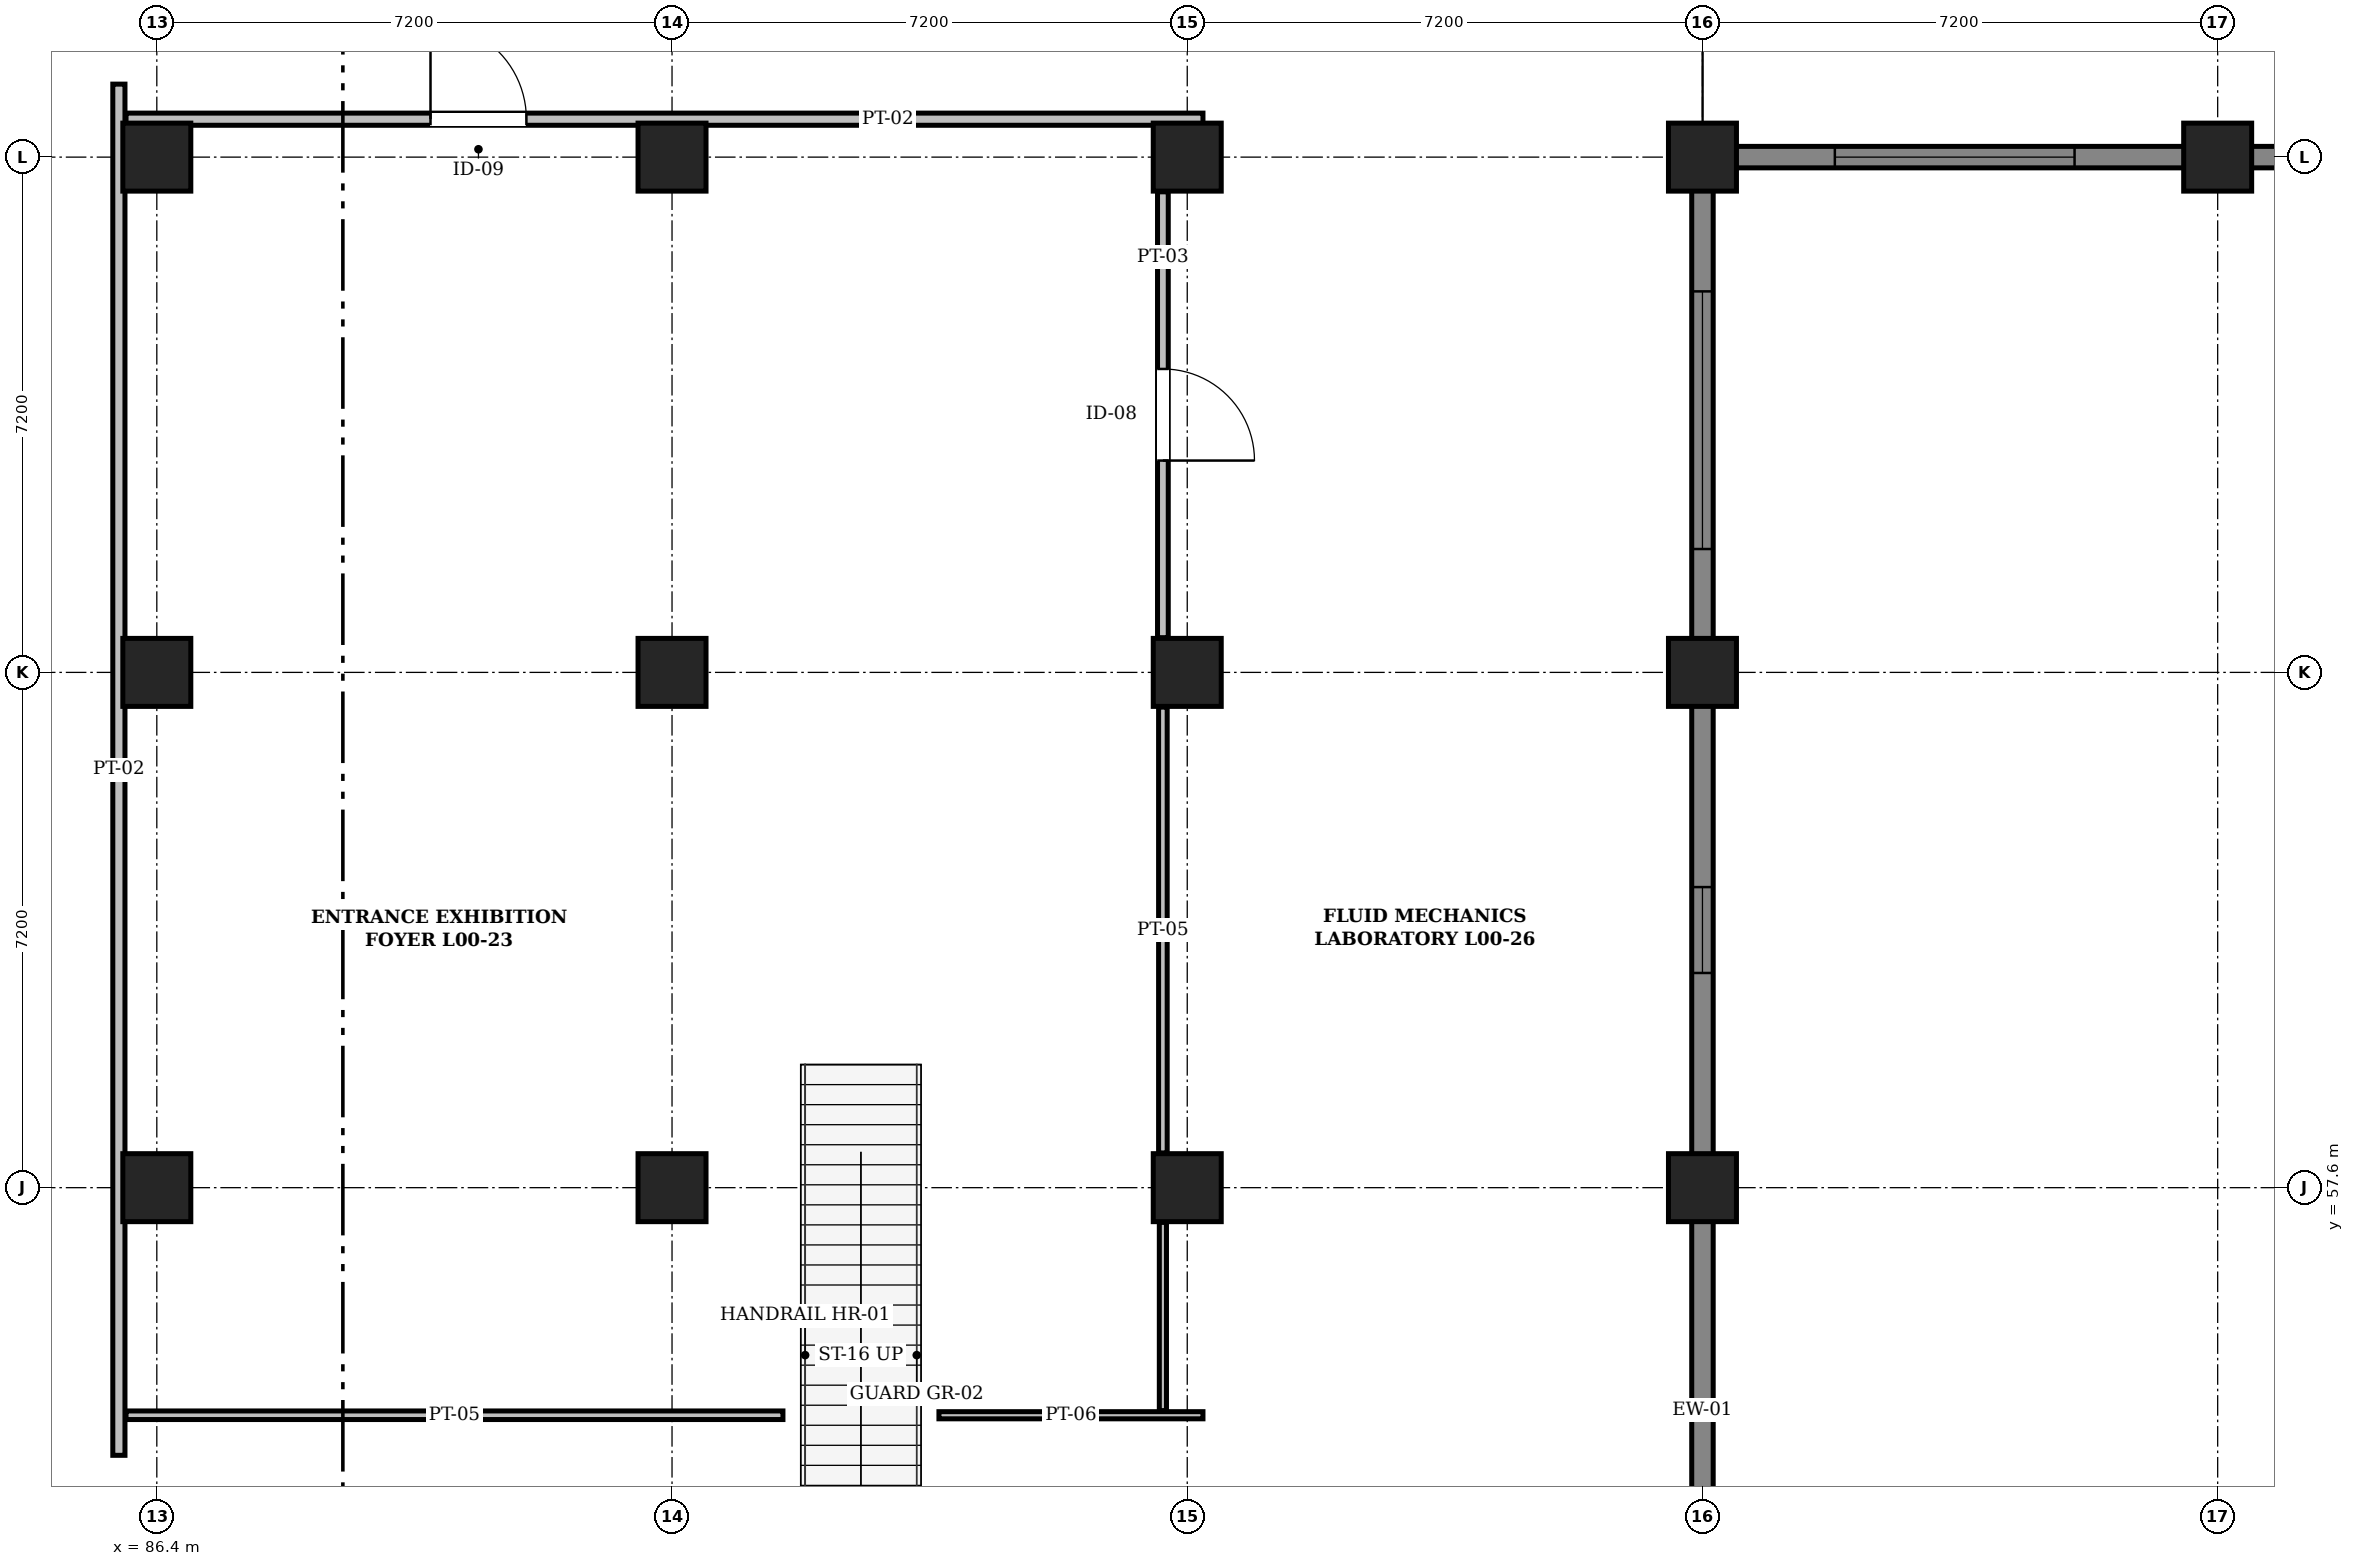
"""IFC4 building model, lengths in metres.
Left out: names, types, materials, properties, quantities, classifications, styles, units other than length and angle.
Written with IfcOpenShell. Run it as: python <this file> out.ifc"""

import sys

from ifc_helpers import new_model, si_unit, direction, frame, frame_2d, origin, origin_2d, place, context, subcontext, project, spatial, rectangle, extrude, element, fill, save


model = new_model("IFC4")
c1 = context("Model", 3, precision=1e-05, world=origin(), true_north=direction((0.0, 1.0)))
c2 = subcontext(c1, "Body", "Model", "MODEL_VIEW")
j1 = project(units=[si_unit("LENGTHUNIT", "METRE"), si_unit("PLANEANGLEUNIT", "RADIAN")], contexts=[c1])
p1 = place(None, origin())
s1 = spatial("IfcSite", under=j1, at=p1, CompositionType="ELEMENT")
p2 = place(p1, origin())
s2 = spatial("IfcBuilding", under=s1, at=p2, CompositionType="ELEMENT")
p3 = place(p2, origin())
s3 = spatial("IfcBuildingStorey", under=s2, at=p3, CompositionType="ELEMENT", Elevation=0.0)
for number, where, z_axis, x_axis in (
    (1, (86.4, 57.6, 0.0), (0.0, 0.0, 1.0), (1.0, 0.0, 0.0)),
    (2, (86.4, 64.8, 0.0), (0.0, 0.0, 1.0), (1.0, 0.0, 0.0)),
    (3, (86.4, 72.0, 0.0), (0.0, 0.0, 1.0), (1.0, 0.0, 0.0)),
    (4, (93.6, 57.6, 0.0), (0.0, 0.0, 1.0), (1.0, 0.0, 0.0)),
    (5, (93.6, 64.8, 0.0), (0.0, 0.0, 1.0), (1.0, 0.0, 0.0)),
    (6, (93.6, 72.0, 0.0), (0.0, 0.0, 1.0), (1.0, 0.0, 0.0)),
    (7, (100.8, 57.6, 0.0), (0.0, 0.0, 1.0), (1.0, 0.0, 0.0)),
    (8, (100.8, 64.8, 0.0), (0.0, 0.0, 1.0), (1.0, 0.0, 0.0)),
    (9, (100.8, 72.0, 0.0), (0.0, 0.0, 1.0), (1.0, 0.0, 0.0)),
    (10, (108.0, 57.6, 0.0), (0.0, 0.0, 1.0), (1.0, 0.0, 0.0)),
    (11, (108.0, 64.8, 0.0), (0.0, 0.0, 1.0), (1.0, 0.0, 0.0)),
    (12, (108.0, 72.0, 0.0), (0.0, 0.0, 1.0), (1.0, 0.0, 0.0)),
    (13, (115.2, 72.0, 0.0), (0.0, 0.0, 1.0), (1.0, 0.0, 0.0)),
):
    element("IfcColumn", number, at=place(p3, frame(where, z_axis=z_axis, x_axis=x_axis)), inside=s3, PredefinedType="COLUMN", context=c2, shape_type="SweptSolid", body=[
        extrude(rectangle(XDim=0.95, YDim=0.95, at=origin_2d()), origin(), (0.0, 0.0, 1.0), 4.8),
    ])
p4 = place(p3, frame((122.4, 72.0, 0.0), z_axis=(0.0, 0.0, 1.0), x_axis=(-1.0, 0.0, 0.0)))
e14 = element("IfcWall", 14, at=p4, inside=s3, PredefinedType="SOLIDWALL", context=c2, shape_type="SweptSolid", body=[
    extrude(rectangle(XDim=7.2, YDim=0.3, at=frame_2d((3.6, 0.0))), origin(), (0.0, 0.0, 1.0), 4.52),
])
p5 = place(p4, frame((2.05, 0.0, 0.95)))
e15 = element("IfcOpeningElement", 15, at=p5, cuts=e14, PredefinedType="OPENING", context=c2, shape_type="SweptSolid", body=[
    extrude(rectangle(XDim=3.1, YDim=1.55, at=frame_2d((1.55, 0.775))), frame((0.0, 0.162, 0.0), z_axis=(0.0, -1.0, 0.0), x_axis=(1.0, 0.0, 0.0)), (0.0, 0.0, 1.0), 0.324),
])
p6 = place(p3, frame((115.2, 72.0, 0.0), z_axis=(0.0, 0.0, 1.0), x_axis=(-1.0, 0.0, 0.0)))
e16 = element("IfcWall", 16, at=p6, inside=s3, PredefinedType="SOLIDWALL", context=c2, shape_type="SweptSolid", body=[
    extrude(rectangle(XDim=7.35, YDim=0.3, at=frame_2d((3.675, 0.0))), origin(), (0.0, 0.0, 1.0), 4.52),
])
p7 = place(p6, frame((2.0, 0.0, 0.95)))
e17 = element("IfcOpeningElement", 17, at=p7, cuts=e16, PredefinedType="OPENING", context=c2, shape_type="SweptSolid", body=[
    extrude(rectangle(XDim=3.35, YDim=1.55, at=frame_2d((1.675, 0.775))), frame((0.0, 0.162, 0.0), z_axis=(0.0, -1.0, 0.0), x_axis=(1.0, 0.0, 0.0)), (0.0, 0.0, 1.0), 0.324),
])
p8 = place(p3, frame((108.0, 71.848, 0.0), z_axis=(0.0, 0.0, 1.0), x_axis=(0.0, -1.0, 0.0)))
e18 = element("IfcWall", 18, at=p8, inside=s3, PredefinedType="SOLIDWALL", context=c2, shape_type="SweptSolid", body=[
    extrude(rectangle(XDim=7.048, YDim=0.3, at=frame_2d((3.524, 0.0))), origin(), (0.0, 0.0, 1.0), 4.52),
])
p9 = place(p8, frame((1.724, 0.0, 0.95)))
e19 = element("IfcOpeningElement", 19, at=p9, cuts=e18, PredefinedType="OPENING", context=c2, shape_type="SweptSolid", body=[
    extrude(rectangle(XDim=3.6, YDim=1.55, at=frame_2d((1.8, 0.775))), frame((0.0, 0.162, 0.0), z_axis=(0.0, -1.0, 0.0), x_axis=(1.0, 0.0, 0.0)), (0.0, 0.0, 1.0), 0.324),
])
p10 = place(p3, frame((108.0, 64.8, 0.0), z_axis=(0.0, 0.0, 1.0), x_axis=(0.0, -1.0, 0.0)))
e20 = element("IfcWall", 20, at=p10, inside=s3, PredefinedType="SOLIDWALL", context=c2, shape_type="SweptSolid", body=[
    extrude(rectangle(XDim=7.2, YDim=0.3, at=frame_2d((3.6, 0.0))), origin(), (0.0, 0.0, 1.0), 4.52),
])
p11 = place(p10, frame((3.0, 0.0, 0.95)))
e21 = element("IfcOpeningElement", 21, at=p11, cuts=e20, PredefinedType="OPENING", context=c2, shape_type="SweptSolid", body=[
    extrude(rectangle(XDim=1.2, YDim=1.8, at=frame_2d((0.6, 0.9))), frame((0.0, 0.162, 0.0), z_axis=(0.0, -1.0, 0.0), x_axis=(1.0, 0.0, 0.0)), (0.0, 0.0, 1.0), 0.324),
])
p12 = place(p3, frame((108.0, 57.6, 0.0), z_axis=(0.0, 0.0, 1.0), x_axis=(0.0, -1.0, 0.0)))
e22 = element("IfcWall", 22, at=p12, inside=s3, PredefinedType="SOLIDWALL", context=c2, shape_type="SweptSolid", body=[
    extrude(rectangle(XDim=7.2, YDim=0.3, at=frame_2d((3.6, 0.0))), origin(), (0.0, 0.0, 1.0), 4.52),
])
p13 = place(p12, frame((4.455, 0.0, 0.95)))
e23 = element("IfcOpeningElement", 23, at=p13, cuts=e22, PredefinedType="OPENING", context=c2, shape_type="SweptSolid", body=[
    extrude(rectangle(XDim=1.45, YDim=1.8, at=frame_2d((0.725, 0.9))), frame((0.0, 0.162, 0.0), z_axis=(0.0, -1.0, 0.0), x_axis=(1.0, 0.0, 0.0)), (0.0, 0.0, 1.0), 0.324),
])
p14 = place(p3, frame((85.87, 53.86, 0.0), z_axis=(0.0, 0.0, 1.0), x_axis=(0.0, 1.0, 0.0)))
e24 = element("IfcWall", 24, at=p14, inside=s3, PredefinedType="PARTITIONING", context=c2, shape_type="SweptSolid", body=[
    extrude(rectangle(XDim=19.16, YDim=0.17, at=frame_2d((9.58, 0.0))), origin(), (0.0, 0.0, 1.0), 4.46),
])
p15 = place(p3, frame((85.97, 72.53, 0.0), z_axis=(0.0, 0.0, 1.0), x_axis=(1.0, 0.0, 0.0)))
e25 = element("IfcWall", 25, at=p15, inside=s3, PredefinedType="PARTITIONING", context=c2, shape_type="SweptSolid", body=[
    extrude(rectangle(XDim=15.05, YDim=0.17, at=frame_2d((7.525, 0.0))), origin(), (0.0, 0.0, 1.0), 4.46),
])
p16 = place(p15, frame((4.255, 0.0, 0.0)))
e26 = element("IfcOpeningElement", 26, at=p16, cuts=e25, PredefinedType="OPENING", context=c2, shape_type="SweptSolid", body=[
    extrude(rectangle(XDim=1.34, YDim=2.24, at=frame_2d((0.67, 1.12))), frame((0.0, 0.097, 0.0), z_axis=(0.0, -1.0, 0.0), x_axis=(1.0, 0.0, 0.0)), (0.0, 0.0, 1.0), 0.194),
])
p17 = place(p3, frame((85.97, 54.42, 0.0), z_axis=(0.0, 0.0, 1.0), x_axis=(1.0, 0.0, 0.0)))
e27 = element("IfcWall", 27, at=p17, inside=s3, PredefinedType="PARTITIONING", context=c2, shape_type="SweptSolid", body=[
    extrude(rectangle(XDim=9.18, YDim=0.12, at=frame_2d((4.59, 0.0))), origin(), (0.0, 0.0, 1.0), 4.46),
])
p18 = place(p3, frame((97.33, 54.42, 0.0), z_axis=(0.0, 0.0, 1.0), x_axis=(1.0, 0.0, 0.0)))
e28 = element("IfcWall", 28, at=p18, inside=s3, PredefinedType="PARTITIONING", context=c2, shape_type="SweptSolid", body=[
    extrude(rectangle(XDim=3.69, YDim=0.1, at=frame_2d((1.845, 0.0))), origin(), (0.0, 0.0, 1.0), 4.46),
])
p19 = place(p3, frame((100.46, 65.285, 0.0), z_axis=(0.0, 0.0, 1.0), x_axis=(0.0, 1.0, 0.0)))
e29 = element("IfcWall", 29, at=p19, inside=s3, PredefinedType="PARTITIONING", context=c2, shape_type="SweptSolid", body=[
    extrude(rectangle(XDim=6.23, YDim=0.15, at=frame_2d((3.115, 0.0))), origin(), (0.0, 0.0, 1.0), 4.08),
])
p20 = place(p19, frame((2.475, 0.0, 0.0)))
e30 = element("IfcOpeningElement", 30, at=p20, cuts=e29, PredefinedType="OPENING", context=c2, shape_type="SweptSolid", body=[
    extrude(rectangle(XDim=1.28, YDim=2.22, at=frame_2d((0.64, 1.11))), frame((0.0, 0.087, 0.0), z_axis=(0.0, -1.0, 0.0), x_axis=(1.0, 0.0, 0.0)), (0.0, 0.0, 1.0), 0.174),
])
p21 = place(p3, frame((100.46, 58.085, 0.0), z_axis=(0.0, 0.0, 1.0), x_axis=(0.0, 1.0, 0.0)))
e31 = element("IfcWall", 31, at=p21, inside=s3, PredefinedType="PARTITIONING", context=c2, shape_type="SweptSolid", body=[
    extrude(rectangle(XDim=6.23, YDim=0.12, at=frame_2d((3.115, 0.0))), origin(), (0.0, 0.0, 1.0), 4.08),
])
p22 = place(p3, frame((100.46, 54.485, 0.0), z_axis=(0.0, 0.0, 1.0), x_axis=(0.0, 1.0, 0.0)))
e32 = element("IfcWall", 32, at=p22, inside=s3, PredefinedType="PARTITIONING", context=c2, shape_type="SweptSolid", body=[
    extrude(rectangle(XDim=2.63, YDim=0.1, at=frame_2d((1.315, 0.0))), origin(), (0.0, 0.0, 1.0), 4.46),
])
p23 = place(p7, origin())
e33 = element("IfcWindow", 33, at=p23, inside=s3, PartitioningType="SINGLE_PANEL", PredefinedType="WINDOW", context=c2, shape_type="SweptSolid", body=[
    extrude(rectangle(XDim=3.35, YDim=1.55, at=frame_2d((1.675, 0.775))), frame((0.0, 0.03, 0.0), z_axis=(0.0, -1.0, 0.0), x_axis=(1.0, 0.0, 0.0)), (0.0, 0.0, 1.0), 0.06),
])
fill(e17, e33)
p24 = place(p9, origin())
e34 = element("IfcWindow", 34, at=p24, inside=s3, PartitioningType="SINGLE_PANEL", PredefinedType="WINDOW", context=c2, shape_type="SweptSolid", body=[
    extrude(rectangle(XDim=3.6, YDim=1.55, at=frame_2d((1.8, 0.775))), frame((0.0, 0.03, 0.0), z_axis=(0.0, -1.0, 0.0), x_axis=(1.0, 0.0, 0.0)), (0.0, 0.0, 1.0), 0.06),
])
fill(e19, e34)
p25 = place(p11, origin())
e35 = element("IfcWindow", 35, at=p25, inside=s3, PartitioningType="SINGLE_PANEL", PredefinedType="WINDOW", context=c2, shape_type="SweptSolid", body=[
    extrude(rectangle(XDim=1.2, YDim=1.8, at=frame_2d((0.6, 0.9))), frame((0.0, 0.03, 0.0), z_axis=(0.0, -1.0, 0.0), x_axis=(1.0, 0.0, 0.0)), (0.0, 0.0, 1.0), 0.06),
])
fill(e21, e35)
p26 = place(p16, origin())
e36 = element("IfcDoor", 36, at=p26, inside=s3, OperationType="SINGLE_SWING_LEFT", PredefinedType="DOOR", context=c2, shape_type="SweptSolid", body=[
    extrude(rectangle(XDim=1.34, YDim=2.24, at=frame_2d((0.67, 1.12))), frame((0.0, 0.025, 0.0), z_axis=(0.0, -1.0, 0.0), x_axis=(1.0, 0.0, 0.0)), (0.0, 0.0, 1.0), 0.05),
])
fill(e26, e36)
p27 = place(p20, frame((1.28, 0.0, 0.0), z_axis=(0.0, 0.0, 1.0), x_axis=(-1.0, 0.0, 0.0)))
e37 = element("IfcDoor", 37, at=p27, inside=s3, OperationType="SINGLE_SWING_RIGHT", PredefinedType="DOOR", context=c2, shape_type="SweptSolid", body=[
    extrude(rectangle(XDim=1.28, YDim=2.22, at=frame_2d((0.64, 1.11))), frame((0.0, 0.025, 0.0), z_axis=(0.0, -1.0, 0.0), x_axis=(1.0, 0.0, 0.0)), (0.0, 0.0, 1.0), 0.05),
])
fill(e30, e37)
save(model, sys.argv[1])
